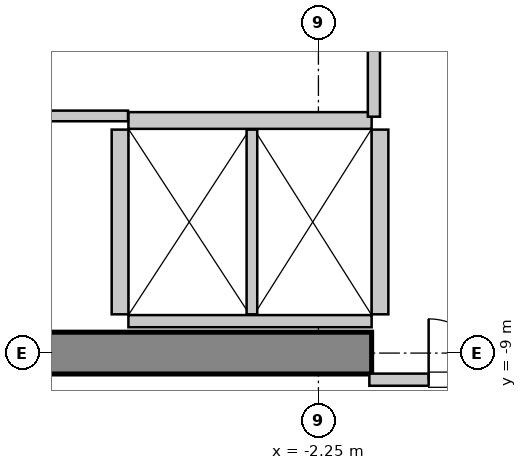
"""IFC4 building model, lengths in metres.
Left out: names, types, materials, properties, quantities, classifications, styles, units other than length and angle.
Written with IfcOpenShell. Run it as: python <this file> out.ifc"""

import sys

from ifc_helpers import new_model, si_unit, direction, frame, frame_2d, origin, place, context, subcontext, project, spatial, rectangle, extrude, source, transform, mapped, element, fill, save


model = new_model("IFC4")
c1 = context("Model", 3, precision=1e-05, world=origin(), true_north=direction((0.0, 1.0)))
c2 = subcontext(c1, "Body", "Model", "MODEL_VIEW")
j1 = project(units=[si_unit("LENGTHUNIT", "METRE"), si_unit("PLANEANGLEUNIT", "RADIAN")], contexts=[c1])
p1 = place(None, origin())
s1 = spatial("IfcSite", under=j1, at=p1, CompositionType="ELEMENT")
p2 = place(p1, origin())
s2 = spatial("IfcBuilding", under=s1, at=p2, CompositionType="ELEMENT")
p3 = place(p2, frame((0.0, 0.0, 117.4)))
s3 = spatial("IfcBuildingStorey", under=s2, at=p3, CompositionType="ELEMENT", Elevation=117.4)
m1 = source(origin(), c2, "Body", "SweptSolid", [
    extrude(rectangle(XDim=9.975, YDim=0.55, at=frame_2d((4.987, 0.0))), origin(), (0.0, 0.0, 1.0), 3.8),
])
p4 = place(p3, frame((-11.525, -9.0, 0.0), z_axis=(0.0, 0.0, 1.0), x_axis=(1.0, 0.0, 0.0)))
e1 = element("IfcWall", 1, at=p4, inside=s3, PredefinedType="SHEAR", context=c2, shape_type="MappedRepresentation", body=[
    mapped(m1, transform((0.0, 0.0, 0.0), x_axis=(1.0, 0.0, 0.0), y_axis=(0.0, 1.0, 0.0), z_axis=(0.0, 0.0, 1.0), scale=1.0)),
])
m2 = source(origin(), c2, "Body", "SweptSolid", [
    extrude(rectangle(XDim=3.2, YDim=0.22, at=frame_2d((1.6, 0.0))), origin(), (0.0, 0.0, 1.0), 3.535),
])
p5 = place(p3, frame((-1.55, -5.94, 0.0), z_axis=(0.0, 0.0, 1.0), x_axis=(-1.0, 0.0, 0.0)))
e2 = element("IfcWall", 2, at=p5, inside=s3, PredefinedType="SOLIDWALL", context=c2, shape_type="MappedRepresentation", body=[
    mapped(m2, transform((0.0, 0.0, 0.0), x_axis=(1.0, 0.0, 0.0), y_axis=(0.0, 1.0, 0.0), z_axis=(0.0, 0.0, 1.0), scale=1.0)),
])
m3 = source(origin(), c2, "Body", "SweptSolid", [
    extrude(rectangle(XDim=3.2, YDim=0.16, at=frame_2d((1.6, 0.0))), origin(), (0.0, 0.0, 1.0), 2.425),
])
p6 = place(p3, frame((-4.75, -8.58, 0.0), z_axis=(0.0, 0.0, 1.0), x_axis=(1.0, 0.0, 0.0)))
e3 = element("IfcWall", 3, at=p6, inside=s3, PredefinedType="PARTITIONING", context=c2, shape_type="MappedRepresentation", body=[
    mapped(m3, transform((0.0, 0.0, 0.0), x_axis=(1.0, 0.0, 0.0), y_axis=(0.0, 1.0, 0.0), z_axis=(0.0, 0.0, 1.0), scale=1.0)),
])
m4 = source(origin(), c2, "Body", "SweptSolid", [
    extrude(rectangle(XDim=2.43, YDim=0.22, at=frame_2d((1.215, 0.0))), origin(), (0.0, 0.0, 1.0), 3.535),
])
p7 = place(p3, frame((-4.86, -6.06, 0.0), z_axis=(0.0, 0.0, 1.0), x_axis=(0.0, -1.0, 0.0)))
e4 = element("IfcWall", 4, at=p7, inside=s3, PredefinedType="SOLIDWALL", context=c2, shape_type="MappedRepresentation", body=[
    mapped(m4, transform((0.0, 0.0, 0.0), x_axis=(1.0, 0.0, 0.0), y_axis=(0.0, 1.0, 0.0), z_axis=(0.0, 0.0, 1.0), scale=1.0)),
])
m5 = source(origin(), c2, "Body", "SweptSolid", [
    extrude(rectangle(XDim=2.43, YDim=0.14, at=frame_2d((1.215, 0.0))), origin(), (0.0, 0.0, 1.0), 3.535),
])
p8 = place(p3, frame((-3.125, -8.49, 0.0), z_axis=(0.0, 0.0, 1.0), x_axis=(0.0, 1.0, 0.0)))
e5 = element("IfcWall", 5, at=p8, inside=s3, PredefinedType="PARTITIONING", context=c2, shape_type="MappedRepresentation", body=[
    mapped(m5, transform((0.0, 0.0, 0.0), x_axis=(1.0, 0.0, 0.0), y_axis=(0.0, 1.0, 0.0), z_axis=(0.0, 0.0, 1.0), scale=1.0)),
])
p9 = place(p3, frame((-1.44, -8.49, 0.0), z_axis=(0.0, 0.0, 1.0), x_axis=(0.0, 1.0, 0.0)))
e6 = element("IfcWall", 6, at=p9, inside=s3, PredefinedType="SOLIDWALL", context=c2, shape_type="MappedRepresentation", body=[
    mapped(m4, transform((0.0, 0.0, 0.0), x_axis=(1.0, 0.0, 0.0), y_axis=(0.0, 1.0, 0.0), z_axis=(0.0, 0.0, 1.0), scale=1.0)),
])
m6 = source(origin(), c2, "Body", "SweptSolid", [
    extrude(rectangle(XDim=3.16, YDim=0.16, at=frame_2d((1.58, 0.0))), origin(), (0.0, 0.0, 1.0), 2.425),
])
p10 = place(p3, frame((-1.58, -9.35, 0.0), z_axis=(0.0, 0.0, 1.0), x_axis=(1.0, 0.0, 0.0)))
e7 = element("IfcWall", 7, at=p10, inside=s3, PredefinedType="PARTITIONING", context=c2, shape_type="MappedRepresentation", body=[
    mapped(m6, transform((0.0, 0.0, 0.0), x_axis=(1.0, 0.0, 0.0), y_axis=(0.0, 1.0, 0.0), z_axis=(0.0, 0.0, 1.0), scale=1.0)),
])
p11 = place(p10, frame((0.78, 0.0, 0.0)))
e8 = element("IfcOpeningElement", 8, at=p11, cuts=e7, PredefinedType="OPENING", context=c2, shape_type="SweptSolid", body=[
    extrude(rectangle(XDim=1.6, YDim=2.3, at=frame_2d((0.8, 1.15))), frame((0.0, 0.09, 0.0), z_axis=(0.0, -1.0, 0.0), x_axis=(1.0, 0.0, 0.0)), (0.0, 0.0, 1.0), 0.18),
])
m7 = source(origin(), c2, "Body", "SweptSolid", [
    extrude(rectangle(XDim=2.88, YDim=0.16, at=frame_2d((1.44, 0.0))), origin(), (0.0, 0.0, 1.0), 3.535),
])
p12 = place(p3, frame((-1.52, -5.89, 0.0), z_axis=(0.0, 0.0, 1.0), x_axis=(0.0, 1.0, 0.0)))
e9 = element("IfcWall", 9, at=p12, inside=s3, PredefinedType="PARTITIONING", context=c2, shape_type="MappedRepresentation", body=[
    mapped(m7, transform((0.0, 0.0, 0.0), x_axis=(1.0, 0.0, 0.0), y_axis=(0.0, 1.0, 0.0), z_axis=(0.0, 0.0, 1.0), scale=1.0)),
])
p13 = place(p12, frame((1.015, 0.0, 0.0)))
e10 = element("IfcOpeningElement", 10, at=p13, cuts=e9, PredefinedType="OPENING", context=c2, shape_type="SweptSolid", body=[
    extrude(rectangle(XDim=0.85, YDim=2.1, at=frame_2d((0.425, 1.05))), frame((0.0, 0.09, 0.0), z_axis=(0.0, -1.0, 0.0), x_axis=(1.0, 0.0, 0.0)), (0.0, 0.0, 1.0), 0.18),
])
m8 = source(origin(), c2, "Body", "SweptSolid", [
    extrude(rectangle(XDim=2.435, YDim=0.14, at=frame_2d((1.218, 0.0))), origin(), (0.0, 0.0, 1.0), 3.535),
])
p14 = place(p3, frame((-7.19, -5.88, 0.0), z_axis=(0.0, 0.0, 1.0), x_axis=(1.0, 0.0, 0.0)))
e11 = element("IfcWall", 11, at=p14, inside=s3, PredefinedType="PARTITIONING", context=c2, shape_type="MappedRepresentation", body=[
    mapped(m8, transform((0.0, 0.0, 0.0), x_axis=(1.0, 0.0, 0.0), y_axis=(0.0, 1.0, 0.0), z_axis=(0.0, 0.0, 1.0), scale=1.0)),
])
m9 = source(origin(), c2, "Body", "SweptSolid", [
    extrude(rectangle(XDim=1.6, YDim=2.3, at=frame_2d((0.8, 1.15))), frame((0.0, 0.025, 0.0), z_axis=(0.0, -1.0, 0.0), x_axis=(1.0, 0.0, 0.0)), (0.0, 0.0, 1.0), 0.05),
])
p15 = place(p11, origin())
e12 = element("IfcDoor", 12, at=p15, inside=s3, OperationType="DOUBLE_DOOR_SINGLE_SWING", PredefinedType="DOOR", context=c2, shape_type="MappedRepresentation", body=[
    mapped(m9, transform((0.0, 0.0, 0.0), x_axis=(1.0, 0.0, 0.0), y_axis=(0.0, 1.0, 0.0), z_axis=(0.0, 0.0, 1.0), scale=1.0)),
])
fill(e8, e12)
save(model, sys.argv[1])
